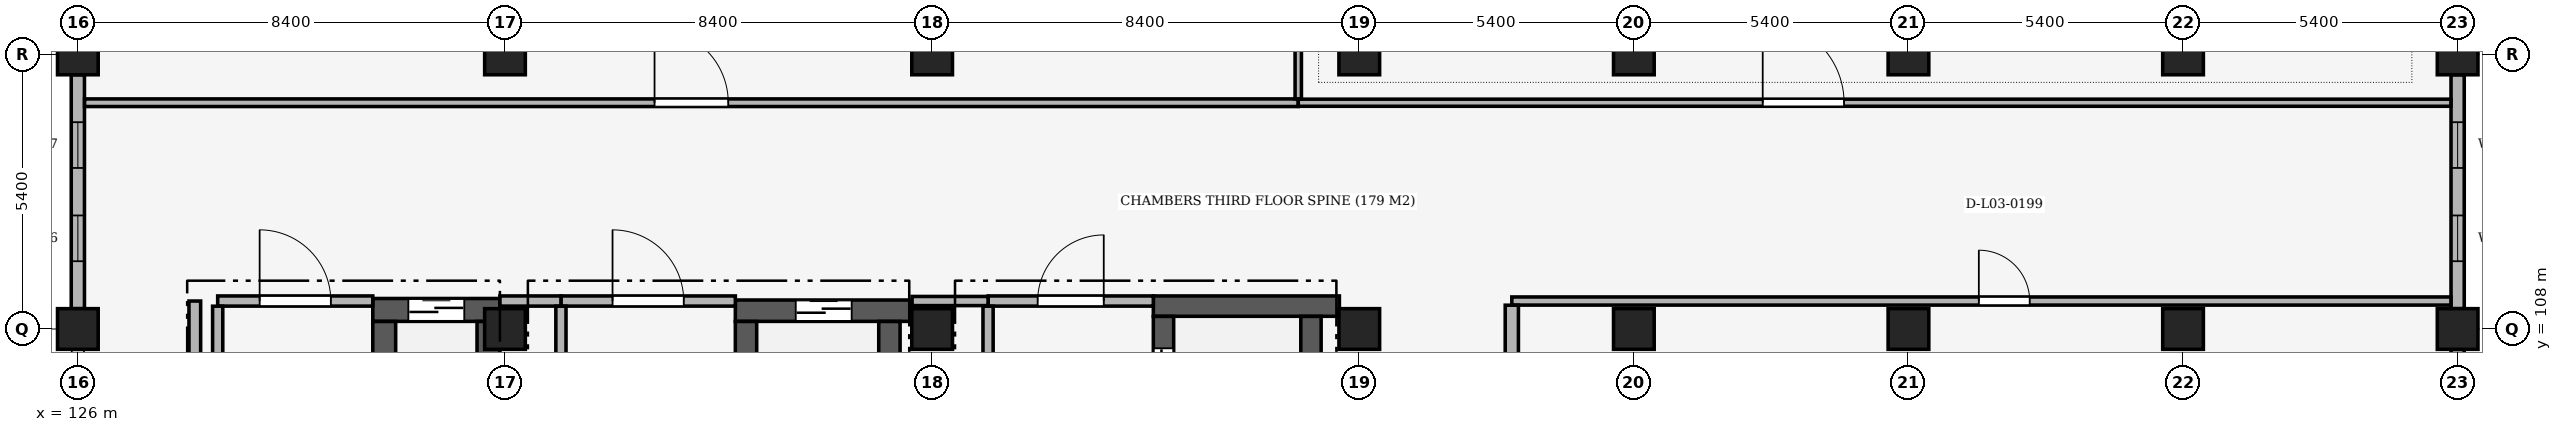
"""IFC4 building model, lengths in metres.
Left out: names, types, materials, properties, quantities, classifications, styles, units other than length and angle.
Written with IfcOpenShell. Run it as: python <this file> out.ifc"""

import sys

from ifc_helpers import new_model, si_unit, direction, frame, frame_2d, origin, origin_2d, place, context, subcontext, project, spatial, rectangle, extrude, element, fill, save


model = new_model("IFC4")
c1 = context("Model", 3, precision=1e-05, world=origin(), true_north=direction((0.0, 1.0)))
c2 = subcontext(c1, "Body", "Model", "MODEL_VIEW")
j1 = project(units=[si_unit("LENGTHUNIT", "METRE"), si_unit("PLANEANGLEUNIT", "RADIAN")], contexts=[c1])
p1 = place(None, origin())
s1 = spatial("IfcSite", under=j1, at=p1, CompositionType="ELEMENT")
p2 = place(p1, origin())
s2 = spatial("IfcBuilding", under=s1, at=p2, CompositionType="ELEMENT")
p3 = place(p2, frame((0.0, 0.0, 15.3)))
s3 = spatial("IfcBuildingStorey", under=s2, at=p3, CompositionType="ELEMENT", Elevation=15.3)
for number, where, z_axis, x_axis in (
    (1, (126.0, 108.0, 0.0), (0.0, 0.0, 1.0), (1.0, 0.0, 0.0)),
    (2, (126.0, 113.4, 0.0), (0.0, 0.0, 1.0), (1.0, 0.0, 0.0)),
    (3, (134.4, 108.0, 0.0), (0.0, 0.0, 1.0), (1.0, 0.0, 0.0)),
    (4, (134.4, 113.4, 0.0), (0.0, 0.0, 1.0), (1.0, 0.0, 0.0)),
    (5, (142.8, 108.0, 0.0), (0.0, 0.0, 1.0), (1.0, 0.0, 0.0)),
    (6, (142.8, 113.4, 0.0), (0.0, 0.0, 1.0), (1.0, 0.0, 0.0)),
    (7, (151.2, 108.0, 0.0), (0.0, 0.0, 1.0), (1.0, 0.0, 0.0)),
    (8, (151.2, 113.4, 0.0), (0.0, 0.0, 1.0), (1.0, 0.0, 0.0)),
    (9, (156.6, 108.0, 0.0), (0.0, 0.0, 1.0), (1.0, 0.0, 0.0)),
    (10, (156.6, 113.4, 0.0), (0.0, 0.0, 1.0), (1.0, 0.0, 0.0)),
    (11, (162.0, 108.0, 0.0), (0.0, 0.0, 1.0), (1.0, 0.0, 0.0)),
    (12, (162.0, 113.4, 0.0), (0.0, 0.0, 1.0), (1.0, 0.0, 0.0)),
    (13, (167.4, 108.0, 0.0), (0.0, 0.0, 1.0), (1.0, 0.0, 0.0)),
    (14, (167.4, 113.4, 0.0), (0.0, 0.0, 1.0), (1.0, 0.0, 0.0)),
    (15, (172.8, 108.0, 0.0), (0.0, 0.0, 1.0), (1.0, 0.0, 0.0)),
    (16, (172.8, 113.4, 0.0), (0.0, 0.0, 1.0), (1.0, 0.0, 0.0)),
):
    element("IfcColumn", number, at=place(p3, frame(where, z_axis=z_axis, x_axis=x_axis)), inside=s3, PredefinedType="COLUMN", context=c2, shape_type="SweptSolid", body=[
        extrude(rectangle(XDim=0.8, YDim=0.8, at=origin_2d()), origin(), (0.0, 0.0, 1.0), 5.1),
    ])
p4 = place(p3, frame((126.0, 108.4, 0.0), z_axis=(0.0, 0.0, 1.0), x_axis=(0.0, 1.0, 0.0)))
e17 = element("IfcWall", 17, at=p4, inside=s3, PredefinedType="SOLIDWALL", context=c2, shape_type="SweptSolid", body=[
    extrude(rectangle(XDim=4.6, YDim=0.26, at=frame_2d((2.3, 0.0))), origin(), (0.0, 0.0, 1.0), 4.29),
])
p5 = place(p4, frame((0.933, 0.0, 0.9)))
e18 = element("IfcOpeningElement", 18, at=p5, cuts=e17, PredefinedType="OPENING", context=c2, shape_type="SweptSolid", body=[
    extrude(rectangle(XDim=0.9, YDim=2.2, at=frame_2d((0.45, 1.1))), frame((0.0, 0.145, 0.0), z_axis=(0.0, -1.0, 0.0), x_axis=(1.0, 0.0, 0.0)), (0.0, 0.0, 1.0), 0.29),
])
p6 = place(p4, frame((2.767, 0.0, 0.9)))
e19 = element("IfcOpeningElement", 19, at=p6, cuts=e17, PredefinedType="OPENING", context=c2, shape_type="SweptSolid", body=[
    extrude(rectangle(XDim=0.9, YDim=2.2, at=frame_2d((0.45, 1.1))), frame((0.0, 0.145, 0.0), z_axis=(0.0, -1.0, 0.0), x_axis=(1.0, 0.0, 0.0)), (0.0, 0.0, 1.0), 0.29),
])
p7 = place(p3, frame((172.8, 113.0, 0.0), z_axis=(0.0, 0.0, 1.0), x_axis=(0.0, -1.0, 0.0)))
e20 = element("IfcWall", 20, at=p7, inside=s3, PredefinedType="SOLIDWALL", context=c2, shape_type="SweptSolid", body=[
    extrude(rectangle(XDim=4.6, YDim=0.26, at=frame_2d((2.3, 0.0))), origin(), (0.0, 0.0, 1.0), 4.29),
])
p8 = place(p7, frame((0.933, 0.0, 0.9)))
e21 = element("IfcOpeningElement", 21, at=p8, cuts=e20, PredefinedType="OPENING", context=c2, shape_type="SweptSolid", body=[
    extrude(rectangle(XDim=0.9, YDim=2.2, at=frame_2d((0.45, 1.1))), frame((0.0, 0.145, 0.0), z_axis=(0.0, -1.0, 0.0), x_axis=(1.0, 0.0, 0.0)), (0.0, 0.0, 1.0), 0.29),
])
p9 = place(p7, frame((2.767, 0.0, 0.9)))
e22 = element("IfcOpeningElement", 22, at=p9, cuts=e20, PredefinedType="OPENING", context=c2, shape_type="SweptSolid", body=[
    extrude(rectangle(XDim=0.9, YDim=2.2, at=frame_2d((0.45, 1.1))), frame((0.0, 0.145, 0.0), z_axis=(0.0, -1.0, 0.0), x_axis=(1.0, 0.0, 0.0)), (0.0, 0.0, 1.0), 0.29),
])
p10 = place(p3, frame((172.8, 107.6, 0.0), z_axis=(0.0, 0.0, 1.0), x_axis=(0.0, -1.0, 0.0)))
e23 = element("IfcWall", 23, at=p10, inside=s3, PredefinedType="SOLIDWALL", context=c2, shape_type="SweptSolid", body=[
    extrude(rectangle(XDim=7.6, YDim=0.26, at=frame_2d((3.8, 0.0))), origin(), (0.0, 0.0, 1.0), 4.14),
])
p11 = place(p10, frame((1.933, 0.0, 0.9)))
e24 = element("IfcOpeningElement", 24, at=p11, cuts=e23, PredefinedType="OPENING", context=c2, shape_type="SweptSolid", body=[
    extrude(rectangle(XDim=0.9, YDim=2.2, at=frame_2d((0.45, 1.1))), frame((0.0, 0.145, 0.0), z_axis=(0.0, -1.0, 0.0), x_axis=(1.0, 0.0, 0.0)), (0.0, 0.0, 1.0), 0.29),
])
p12 = place(p10, frame((4.767, 0.0, 0.9)))
e25 = element("IfcOpeningElement", 25, at=p12, cuts=e23, PredefinedType="OPENING", context=c2, shape_type="SweptSolid", body=[
    extrude(rectangle(XDim=0.9, YDim=2.2, at=frame_2d((0.45, 1.1))), frame((0.0, 0.145, 0.0), z_axis=(0.0, -1.0, 0.0), x_axis=(1.0, 0.0, 0.0)), (0.0, 0.0, 1.0), 0.29),
])
p13 = place(p3, frame((131.8, 108.375, 0.0), z_axis=(0.0, 0.0, 1.0), x_axis=(1.0, 0.0, 0.0)))
e26 = element("IfcWall", 26, at=p13, inside=s3, PredefinedType="SHEAR", context=c2, shape_type="SweptSolid", body=[
    extrude(rectangle(XDim=2.5, YDim=0.45, at=frame_2d((1.25, 0.0))), origin(), (0.0, 0.0, 1.0), 4.84),
])
p14 = place(p13, frame((0.7, 0.0, 0.0)))
e27 = element("IfcOpeningElement", 27, at=p14, cuts=e26, PredefinedType="OPENING", context=c2, shape_type="SweptSolid", body=[
    extrude(rectangle(XDim=1.1, YDim=2.15, at=frame_2d((0.55, 1.075))), frame((0.0, 0.24, 0.0), z_axis=(0.0, -1.0, 0.0), x_axis=(1.0, 0.0, 0.0)), (0.0, 0.0, 1.0), 0.48),
])
for number, where, z_axis, x_axis in (
    (28, (132.025, 106.093, 0.0), (0.0, 0.0, 1.0), (0.0, 1.0, 0.0)),
    (29, (134.075, 106.093, 0.0), (0.0, 0.0, 1.0), (0.0, 1.0, 0.0)),
):
    element("IfcWall", number, at=place(p3, frame(where, z_axis=z_axis, x_axis=x_axis)), inside=s3, PredefinedType="SHEAR", context=c2, shape_type="SweptSolid", body=[
        extrude(rectangle(XDim=2.055, YDim=0.45, at=frame_2d((1.027, 0.0))), origin(), (0.0, 0.0, 1.0), 4.84),
    ])
p15 = place(p3, frame((138.93, 108.36, 0.0), z_axis=(0.0, 0.0, 1.0), x_axis=(1.0, 0.0, 0.0)))
e30 = element("IfcWall", 30, at=p15, inside=s3, PredefinedType="SHEAR", context=c2, shape_type="SweptSolid", body=[
    extrude(rectangle(XDim=3.475, YDim=0.42, at=frame_2d((1.738, 0.0))), origin(), (0.0, 0.0, 1.0), 4.84),
])
p16 = place(p15, frame((1.187, 0.0, 0.0)))
e31 = element("IfcOpeningElement", 31, at=p16, cuts=e30, PredefinedType="OPENING", context=c2, shape_type="SweptSolid", body=[
    extrude(rectangle(XDim=1.1, YDim=2.15, at=frame_2d((0.55, 1.075))), frame((0.0, 0.225, 0.0), z_axis=(0.0, -1.0, 0.0), x_axis=(1.0, 0.0, 0.0)), (0.0, 0.0, 1.0), 0.45),
])
for number, where, z_axis, x_axis in (
    (32, (139.14, 106.093, 0.0), (0.0, 0.0, 1.0), (0.0, 1.0, 0.0)),
    (33, (141.96, 106.093, 0.0), (0.0, 0.0, 1.0), (0.0, 1.0, 0.0)),
):
    element("IfcWall", number, at=place(p3, frame(where, z_axis=z_axis, x_axis=x_axis)), inside=s3, PredefinedType="SHEAR", context=c2, shape_type="SweptSolid", body=[
        extrude(rectangle(XDim=2.055, YDim=0.42, at=frame_2d((1.027, 0.0))), origin(), (0.0, 0.0, 1.0), 4.84),
    ])
p17 = place(p3, frame((147.15, 108.45, 0.0), z_axis=(0.0, 0.0, 1.0), x_axis=(1.0, 0.0, 0.0)))
e34 = element("IfcWall", 34, at=p17, inside=s3, PredefinedType="SHEAR", context=c2, shape_type="SweptSolid", body=[
    extrude(rectangle(XDim=3.659, YDim=0.4, at=frame_2d((1.83, 0.0))), origin(), (0.0, 0.0, 1.0), 4.84),
])
p18 = place(p3, frame((147.35, 105.793, 0.0), z_axis=(0.0, 0.0, 1.0), x_axis=(0.0, 1.0, 0.0)))
e35 = element("IfcWall", 35, at=p18, inside=s3, PredefinedType="SHEAR", context=c2, shape_type="SweptSolid", body=[
    extrude(rectangle(XDim=2.455, YDim=0.4, at=frame_2d((1.228, 0.0))), origin(), (0.0, 0.0, 1.0), 4.84),
])
p19 = place(p18, frame((0.627, 0.0, 0.0)))
e36 = element("IfcOpeningElement", 36, at=p19, cuts=e35, PredefinedType="OPENING", context=c2, shape_type="SweptSolid", body=[
    extrude(rectangle(XDim=1.2, YDim=2.15, at=frame_2d((0.6, 1.075))), frame((0.0, 0.215, 0.0), z_axis=(0.0, -1.0, 0.0), x_axis=(1.0, 0.0, 0.0)), (0.0, 0.0, 1.0), 0.43),
])
p20 = place(p3, frame((150.25, 105.793, 0.0), z_axis=(0.0, 0.0, 1.0), x_axis=(0.0, 1.0, 0.0)))
e37 = element("IfcWall", 37, at=p20, inside=s3, PredefinedType="SHEAR", context=c2, shape_type="SweptSolid", body=[
    extrude(rectangle(XDim=2.455, YDim=0.4, at=frame_2d((1.228, 0.0))), origin(), (0.0, 0.0, 1.0), 4.84),
])
p21 = place(p3, frame((128.75, 108.55, 0.0), z_axis=(0.0, 0.0, 1.0), x_axis=(1.0, 0.0, 0.0)))
e38 = element("IfcWall", 38, at=p21, inside=s3, PredefinedType="PARTITIONING", context=c2, shape_type="SweptSolid", body=[
    extrude(rectangle(XDim=3.05, YDim=0.2, at=frame_2d((1.525, 0.0))), origin(), (0.0, 0.0, 1.0), 4.84),
])
p22 = place(p21, frame((0.825, 0.0, 0.0)))
e39 = element("IfcOpeningElement", 39, at=p22, cuts=e38, PredefinedType="OPENING", context=c2, shape_type="SweptSolid", body=[
    extrude(rectangle(XDim=1.4, YDim=2.2, at=frame_2d((0.7, 1.1))), frame((0.0, 0.115, 0.0), z_axis=(0.0, -1.0, 0.0), x_axis=(1.0, 0.0, 0.0)), (0.0, 0.0, 1.0), 0.23),
])
p23 = place(p3, frame((135.5, 108.55, 0.0), z_axis=(0.0, 0.0, 1.0), x_axis=(1.0, 0.0, 0.0)))
e40 = element("IfcWall", 40, at=p23, inside=s3, PredefinedType="PARTITIONING", context=c2, shape_type="SweptSolid", body=[
    extrude(rectangle(XDim=3.43, YDim=0.2, at=frame_2d((1.715, 0.0))), origin(), (0.0, 0.0, 1.0), 4.84),
])
p24 = place(p23, frame((1.015, 0.0, 0.0)))
e41 = element("IfcOpeningElement", 41, at=p24, cuts=e40, PredefinedType="OPENING", context=c2, shape_type="SweptSolid", body=[
    extrude(rectangle(XDim=1.4, YDim=2.2, at=frame_2d((0.7, 1.1))), frame((0.0, 0.115, 0.0), z_axis=(0.0, -1.0, 0.0), x_axis=(1.0, 0.0, 0.0)), (0.0, 0.0, 1.0), 0.23),
])
p25 = place(p3, frame((143.9, 108.55, 0.0), z_axis=(0.0, 0.0, 1.0), x_axis=(1.0, 0.0, 0.0)))
e42 = element("IfcWall", 42, at=p25, inside=s3, PredefinedType="PARTITIONING", context=c2, shape_type="SweptSolid", body=[
    extrude(rectangle(XDim=3.25, YDim=0.2, at=frame_2d((1.625, 0.0))), origin(), (0.0, 0.0, 1.0), 4.84),
])
p26 = place(p25, frame((0.975, 0.0, 0.0)))
e43 = element("IfcOpeningElement", 43, at=p26, cuts=e42, PredefinedType="OPENING", context=c2, shape_type="SweptSolid", body=[
    extrude(rectangle(XDim=1.3, YDim=2.2, at=frame_2d((0.65, 1.1))), frame((0.0, 0.115, 0.0), z_axis=(0.0, -1.0, 0.0), x_axis=(1.0, 0.0, 0.0)), (0.0, 0.0, 1.0), 0.23),
])
p27 = place(p3, frame((134.3, 108.55, 0.0), z_axis=(0.0, 0.0, 1.0), x_axis=(1.0, 0.0, 0.0)))
e44 = element("IfcWall", 44, at=p27, inside=s3, PredefinedType="PARTITIONING", context=c2, shape_type="SweptSolid", body=[
    extrude(rectangle(XDim=1.2, YDim=0.2, at=frame_2d((0.6, 0.0))), origin(), (0.0, 0.0, 1.0), 4.29),
])
p28 = place(p3, frame((142.405, 108.55, 0.0), z_axis=(0.0, 0.0, 1.0), x_axis=(1.0, 0.0, 0.0)))
e45 = element("IfcWall", 45, at=p28, inside=s3, PredefinedType="PARTITIONING", context=c2, shape_type="SweptSolid", body=[
    extrude(rectangle(XDim=1.495, YDim=0.18, at=frame_2d((0.748, 0.0))), origin(), (0.0, 0.0, 1.0), 4.29),
])
p29 = place(p3, frame((154.2, 108.55, 0.0), z_axis=(0.0, 0.0, 1.0), x_axis=(1.0, 0.0, 0.0)))
e46 = element("IfcWall", 46, at=p29, inside=s3, PredefinedType="PARTITIONING", context=c2, shape_type="SweptSolid", body=[
    extrude(rectangle(XDim=18.468, YDim=0.16, at=frame_2d((9.234, 0.0))), origin(), (0.0, 0.0, 1.0), 4.29),
])
p30 = place(p29, frame((9.184, 0.0, 0.0)))
e47 = element("IfcOpeningElement", 47, at=p30, cuts=e46, PredefinedType="OPENING", context=c2, shape_type="SweptSolid", body=[
    extrude(rectangle(XDim=1.0, YDim=2.2, at=frame_2d((0.5, 1.1))), frame((0.0, 0.095, 0.0), z_axis=(0.0, -1.0, 0.0), x_axis=(1.0, 0.0, 0.0)), (0.0, 0.0, 1.0), 0.19),
])
p31 = place(p3, frame((126.132, 112.45, 0.0), z_axis=(0.0, 0.0, 1.0), x_axis=(1.0, 0.0, 0.0)))
e48 = element("IfcWall", 48, at=p31, inside=s3, PredefinedType="PARTITIONING", context=c2, shape_type="SweptSolid", body=[
    extrude(rectangle(XDim=23.868, YDim=0.15, at=frame_2d((11.934, 0.0))), origin(), (0.0, 0.0, 1.0), 4.29),
])
p32 = place(p31, frame((11.209, 0.0, 0.0)))
e49 = element("IfcOpeningElement", 49, at=p32, cuts=e48, PredefinedType="OPENING", context=c2, shape_type="SweptSolid", body=[
    extrude(rectangle(XDim=1.45, YDim=2.25, at=frame_2d((0.725, 1.125))), frame((0.0, 0.09, 0.0), z_axis=(0.0, -1.0, 0.0), x_axis=(1.0, 0.0, 0.0)), (0.0, 0.0, 1.0), 0.18),
])
p33 = place(p3, frame((150.0, 112.45, 0.0), z_axis=(0.0, 0.0, 1.0), x_axis=(1.0, 0.0, 0.0)))
e50 = element("IfcWall", 50, at=p33, inside=s3, PredefinedType="PARTITIONING", context=c2, shape_type="SweptSolid", body=[
    extrude(rectangle(XDim=22.668, YDim=0.14, at=frame_2d((11.334, 0.0))), origin(), (0.0, 0.0, 1.0), 4.29),
])
p34 = place(p33, frame((9.134, 0.0, 0.0)))
e51 = element("IfcOpeningElement", 51, at=p34, cuts=e50, PredefinedType="OPENING", context=c2, shape_type="SweptSolid", body=[
    extrude(rectangle(XDim=1.6, YDim=2.3, at=frame_2d((0.8, 1.15))), frame((0.0, 0.085, 0.0), z_axis=(0.0, -1.0, 0.0), x_axis=(1.0, 0.0, 0.0)), (0.0, 0.0, 1.0), 0.17),
])
p35 = place(p3, frame((128.3, 103.702, 0.0), z_axis=(0.0, 0.0, 1.0), x_axis=(0.0, 1.0, 0.0)))
e52 = element("IfcWall", 52, at=p35, inside=s3, PredefinedType="SOLIDWALL", context=c2, shape_type="SweptSolid", body=[
    extrude(rectangle(XDim=4.848, YDim=0.23, at=frame_2d((2.424, 0.0))), origin(), (0.0, 0.0, 1.0), 4.84),
])
p36 = place(p3, frame((128.75, 103.702, 0.0), z_axis=(0.0, 0.0, 1.0), x_axis=(0.0, 1.0, 0.0)))
e53 = element("IfcWall", 53, at=p36, inside=s3, PredefinedType="PARTITIONING", context=c2, shape_type="SweptSolid", body=[
    extrude(rectangle(XDim=4.746, YDim=0.2, at=frame_2d((2.373, 0.0))), origin(), (0.0, 0.0, 1.0), 4.84),
])
p37 = place(p3, frame((135.5, 103.672, 0.0), z_axis=(0.0, 0.0, 1.0), x_axis=(0.0, 1.0, 0.0)))
e54 = element("IfcWall", 54, at=p37, inside=s3, PredefinedType="PARTITIONING", context=c2, shape_type="SweptSolid", body=[
    extrude(rectangle(XDim=4.776, YDim=0.2, at=frame_2d((2.388, 0.0))), origin(), (0.0, 0.0, 1.0), 4.84),
])
p38 = place(p3, frame((143.9, 103.652, 0.0), z_axis=(0.0, 0.0, 1.0), x_axis=(0.0, 1.0, 0.0)))
e55 = element("IfcWall", 55, at=p38, inside=s3, PredefinedType="PARTITIONING", context=c2, shape_type="SweptSolid", body=[
    extrude(rectangle(XDim=4.796, YDim=0.2, at=frame_2d((2.398, 0.0))), origin(), (0.0, 0.0, 1.0), 4.84),
])
p39 = place(p3, frame((150.0, 112.527, 0.0), z_axis=(0.0, 0.0, 1.0), x_axis=(0.0, 1.0, 0.0)))
e56 = element("IfcWall", 56, at=p39, inside=s3, PredefinedType="PARTITIONING", context=c2, shape_type="SweptSolid", body=[
    extrude(rectangle(XDim=6.141, YDim=0.125, at=frame_2d((3.07, 0.0))), origin(), (0.0, 0.0, 1.0), 4.14),
])
p40 = place(p3, frame((154.2, 93.732, 0.0), z_axis=(0.0, 0.0, 1.0), x_axis=(0.0, 1.0, 0.0)))
e57 = element("IfcWall", 57, at=p40, inside=s3, PredefinedType="PARTITIONING", context=c2, shape_type="SweptSolid", body=[
    extrude(rectangle(XDim=14.736, YDim=0.26, at=frame_2d((7.368, 0.0))), origin(), (0.0, 0.0, 1.0), 4.24),
])
p41 = place(p5, origin())
e58 = element("IfcWindow", 58, at=p41, inside=s3, PartitioningType="SINGLE_PANEL", PredefinedType="WINDOW", context=c2, shape_type="SweptSolid", body=[
    extrude(rectangle(XDim=0.9, YDim=2.2, at=frame_2d((0.45, 1.1))), frame((0.0, 0.03, 0.0), z_axis=(0.0, -1.0, 0.0), x_axis=(1.0, 0.0, 0.0)), (0.0, 0.0, 1.0), 0.06),
])
fill(e18, e58)
p42 = place(p6, origin())
e59 = element("IfcWindow", 59, at=p42, inside=s3, PartitioningType="SINGLE_PANEL", PredefinedType="WINDOW", context=c2, shape_type="SweptSolid", body=[
    extrude(rectangle(XDim=0.9, YDim=2.2, at=frame_2d((0.45, 1.1))), frame((0.0, 0.03, 0.0), z_axis=(0.0, -1.0, 0.0), x_axis=(1.0, 0.0, 0.0)), (0.0, 0.0, 1.0), 0.06),
])
fill(e19, e59)
p43 = place(p8, origin())
e60 = element("IfcWindow", 60, at=p43, inside=s3, PartitioningType="SINGLE_PANEL", PredefinedType="WINDOW", context=c2, shape_type="SweptSolid", body=[
    extrude(rectangle(XDim=0.9, YDim=2.2, at=frame_2d((0.45, 1.1))), frame((0.0, 0.03, 0.0), z_axis=(0.0, -1.0, 0.0), x_axis=(1.0, 0.0, 0.0)), (0.0, 0.0, 1.0), 0.06),
])
fill(e21, e60)
p44 = place(p9, origin())
e61 = element("IfcWindow", 61, at=p44, inside=s3, PartitioningType="SINGLE_PANEL", PredefinedType="WINDOW", context=c2, shape_type="SweptSolid", body=[
    extrude(rectangle(XDim=0.9, YDim=2.2, at=frame_2d((0.45, 1.1))), frame((0.0, 0.03, 0.0), z_axis=(0.0, -1.0, 0.0), x_axis=(1.0, 0.0, 0.0)), (0.0, 0.0, 1.0), 0.06),
])
fill(e22, e61)
p45 = place(p14, origin())
e62 = element("IfcDoor", 62, at=p45, inside=s3, OperationType="DOUBLE_DOOR_SLIDING", PredefinedType="DOOR", context=c2, shape_type="SweptSolid", body=[
    extrude(rectangle(XDim=1.1, YDim=2.15, at=frame_2d((0.55, 1.075))), frame((0.0, 0.025, 0.0), z_axis=(0.0, -1.0, 0.0), x_axis=(1.0, 0.0, 0.0)), (0.0, 0.0, 1.0), 0.05),
])
fill(e27, e62)
p46 = place(p16, origin())
e63 = element("IfcDoor", 63, at=p46, inside=s3, OperationType="DOUBLE_DOOR_SLIDING", PredefinedType="DOOR", context=c2, shape_type="SweptSolid", body=[
    extrude(rectangle(XDim=1.1, YDim=2.15, at=frame_2d((0.55, 1.075))), frame((0.0, 0.025, 0.0), z_axis=(0.0, -1.0, 0.0), x_axis=(1.0, 0.0, 0.0)), (0.0, 0.0, 1.0), 0.05),
])
fill(e31, e63)
p47 = place(p19, origin())
e64 = element("IfcDoor", 64, at=p47, inside=s3, OperationType="DOUBLE_DOOR_SLIDING", PredefinedType="DOOR", context=c2, shape_type="SweptSolid", body=[
    extrude(rectangle(XDim=1.2, YDim=2.15, at=frame_2d((0.6, 1.075))), frame((0.0, 0.025, 0.0), z_axis=(0.0, -1.0, 0.0), x_axis=(1.0, 0.0, 0.0)), (0.0, 0.0, 1.0), 0.05),
])
fill(e36, e64)
p48 = place(p22, origin())
e65 = element("IfcDoor", 65, at=p48, inside=s3, OperationType="SINGLE_SWING_LEFT", PredefinedType="DOOR", context=c2, shape_type="SweptSolid", body=[
    extrude(rectangle(XDim=1.4, YDim=2.2, at=frame_2d((0.7, 1.1))), frame((0.0, 0.025, 0.0), z_axis=(0.0, -1.0, 0.0), x_axis=(1.0, 0.0, 0.0)), (0.0, 0.0, 1.0), 0.05),
])
fill(e39, e65)
p49 = place(p24, origin())
e66 = element("IfcDoor", 66, at=p49, inside=s3, OperationType="SINGLE_SWING_LEFT", PredefinedType="DOOR", context=c2, shape_type="SweptSolid", body=[
    extrude(rectangle(XDim=1.4, YDim=2.2, at=frame_2d((0.7, 1.1))), frame((0.0, 0.025, 0.0), z_axis=(0.0, -1.0, 0.0), x_axis=(1.0, 0.0, 0.0)), (0.0, 0.0, 1.0), 0.05),
])
fill(e41, e66)
p50 = place(p26, origin())
e67 = element("IfcDoor", 67, at=p50, inside=s3, OperationType="SINGLE_SWING_RIGHT", PredefinedType="DOOR", context=c2, shape_type="SweptSolid", body=[
    extrude(rectangle(XDim=1.3, YDim=2.2, at=frame_2d((0.65, 1.1))), frame((0.0, 0.025, 0.0), z_axis=(0.0, -1.0, 0.0), x_axis=(1.0, 0.0, 0.0)), (0.0, 0.0, 1.0), 0.05),
])
fill(e43, e67)
p51 = place(p32, origin())
e68 = element("IfcDoor", 68, at=p51, inside=s3, OperationType="SINGLE_SWING_LEFT", PredefinedType="DOOR", context=c2, shape_type="SweptSolid", body=[
    extrude(rectangle(XDim=1.45, YDim=2.25, at=frame_2d((0.725, 1.125))), frame((0.0, 0.025, 0.0), z_axis=(0.0, -1.0, 0.0), x_axis=(1.0, 0.0, 0.0)), (0.0, 0.0, 1.0), 0.05),
])
fill(e49, e68)
p52 = place(p34, origin())
e69 = element("IfcDoor", 69, at=p52, inside=s3, OperationType="SINGLE_SWING_LEFT", PredefinedType="DOOR", context=c2, shape_type="SweptSolid", body=[
    extrude(rectangle(XDim=1.6, YDim=2.3, at=frame_2d((0.8, 1.15))), frame((0.0, 0.025, 0.0), z_axis=(0.0, -1.0, 0.0), x_axis=(1.0, 0.0, 0.0)), (0.0, 0.0, 1.0), 0.05),
])
fill(e51, e69)
p53 = place(p30, origin())
e70 = element("IfcDoor", 70, at=p53, inside=s3, OperationType="SINGLE_SWING_LEFT", PredefinedType="DOOR", context=c2, shape_type="SweptSolid", body=[
    extrude(rectangle(XDim=1.0, YDim=2.2, at=frame_2d((0.5, 1.1))), frame((0.0, 0.025, 0.0), z_axis=(0.0, -1.0, 0.0), x_axis=(1.0, 0.0, 0.0)), (0.0, 0.0, 1.0), 0.05),
])
fill(e47, e70)
save(model, sys.argv[1])
